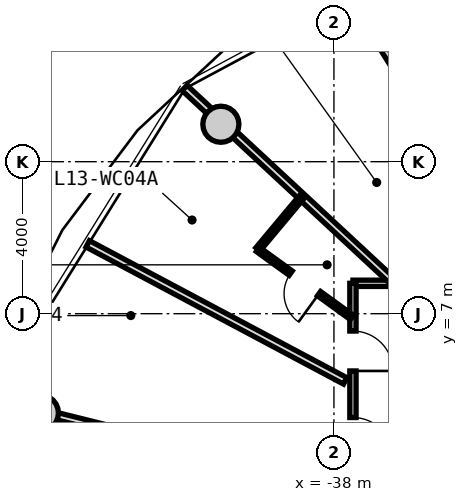
"""IFC4 building model, lengths in metres.
Left out: names, types, materials, properties, quantities, classifications, styles, units other than length and angle.
Written with IfcOpenShell. Run it as: python <this file> out.ifc"""

import sys

from ifc_helpers import new_model, si_unit, direction, frame, frame_2d, origin, origin_2d, place, context, subcontext, project, spatial, rectangle, circle, extrude, source, transform, mapped, element, fill, save


model = new_model("IFC4")
c1 = context("Model", 3, precision=1e-05, world=origin(), true_north=direction((0.0, 1.0)))
c2 = subcontext(c1, "Body", "Model", "MODEL_VIEW")
j1 = project(units=[si_unit("LENGTHUNIT", "METRE"), si_unit("PLANEANGLEUNIT", "RADIAN")], contexts=[c1])
p1 = place(None, origin())
s1 = spatial("IfcSite", under=j1, at=p1, CompositionType="ELEMENT")
p2 = place(p1, origin())
s2 = spatial("IfcBuilding", under=s1, at=p2, CompositionType="ELEMENT")
p3 = place(p2, frame((0.0, 0.0, 46.0)))
s3 = spatial("IfcBuildingStorey", under=s2, at=p3, CompositionType="ELEMENT", Elevation=46.0)
m1 = source(origin(), c2, "Body", "SweptSolid", [
    extrude(circle(Radius=0.475, at=origin_2d()), origin(), (0.0, 0.0, 1.0), 3.05),
])
for number, where, z_axis, x_axis in (
    (1, (-40.975, 11.985, 0.0), (0.0, 0.0, 1.0), (1.0, 0.0, 0.0)),
    (2, (-45.725, 4.387, 0.0), (0.0, 0.0, 1.0), (1.0, 0.0, 0.0)),
):
    element("IfcColumn", number, at=place(p3, frame(where, z_axis=z_axis, x_axis=x_axis)), inside=s3, PredefinedType="COLUMN", context=c2, shape_type="MappedRepresentation", body=[
        mapped(m1, transform((0.0, 0.0, 0.0), x_axis=(1.0, 0.0, 0.0), y_axis=(0.0, 1.0, 0.0), z_axis=(0.0, 0.0, 1.0), scale=1.0)),
    ])
m2 = source(origin(), c2, "Body", "SweptSolid", [
    extrude(rectangle(XDim=19.0, YDim=0.165, at=frame_2d((9.5, 0.0))), origin(), (0.0, 0.0, 1.0), 2.775),
])
p4 = place(p3, frame((-37.5, 7.8, 0.0), z_axis=(0.0, 0.0, 1.0), x_axis=(1.0, 0.0, 0.0)))
e3 = element("IfcWall", 3, at=p4, inside=s3, PredefinedType="PARTITIONING", context=c2, shape_type="MappedRepresentation", body=[
    mapped(m2, transform((0.0, 0.0, 0.0), x_axis=(1.0, 0.0, 0.0), y_axis=(0.0, 1.0, 0.0), z_axis=(0.0, 0.0, 1.0), scale=1.0)),
])
p5 = place(p4, frame((4.773, 0.0, 0.0)))
e4 = element("IfcOpeningElement", 4, at=p5, cuts=e3, PredefinedType="OPENING", context=c2, shape_type="SweptSolid", body=[
    extrude(rectangle(XDim=1.05, YDim=2.15, at=frame_2d((0.525, 1.075))), frame((0.0, 0.093, 0.0), z_axis=(0.0, -1.0, 0.0), x_axis=(1.0, 0.0, 0.0)), (0.0, 0.0, 1.0), 0.185),
])
p6 = place(p4, frame((2.251, 0.0, 0.0)))
e5 = element("IfcOpeningElement", 5, at=p6, cuts=e3, PredefinedType="OPENING", context=c2, shape_type="SweptSolid", body=[
    extrude(rectangle(XDim=1.05, YDim=2.15, at=frame_2d((0.525, 1.075))), frame((0.0, 0.093, 0.0), z_axis=(0.0, -1.0, 0.0), x_axis=(1.0, 0.0, 0.0)), (0.0, 0.0, 1.0), 0.185),
])
p7 = place(p4, frame((14.653, 0.0, 0.0)))
e6 = element("IfcOpeningElement", 6, at=p7, cuts=e3, PredefinedType="OPENING", context=c2, shape_type="SweptSolid", body=[
    extrude(rectangle(XDim=1.05, YDim=2.15, at=frame_2d((0.525, 1.075))), frame((0.0, 0.093, 0.0), z_axis=(0.0, -1.0, 0.0), x_axis=(1.0, 0.0, 0.0)), (0.0, 0.0, 1.0), 0.185),
])
p8 = place(p4, frame((12.5, 0.0, 0.0)))
e7 = element("IfcOpeningElement", 7, at=p8, cuts=e3, PredefinedType="OPENING", context=c2, shape_type="SweptSolid", body=[
    extrude(rectangle(XDim=1.05, YDim=2.15, at=frame_2d((0.525, 1.075))), frame((0.0, 0.093, 0.0), z_axis=(0.0, -1.0, 0.0), x_axis=(1.0, 0.0, 0.0)), (0.0, 0.0, 1.0), 0.185),
])
p9 = place(p4, frame((9.352, 0.0, 0.0)))
e8 = element("IfcOpeningElement", 8, at=p9, cuts=e3, PredefinedType="OPENING", context=c2, shape_type="SweptSolid", body=[
    extrude(rectangle(XDim=1.05, YDim=2.15, at=frame_2d((0.525, 1.075))), frame((0.0, 0.093, 0.0), z_axis=(0.0, -1.0, 0.0), x_axis=(1.0, 0.0, 0.0)), (0.0, 0.0, 1.0), 0.185),
])
p10 = place(p4, frame((7.806, 0.0, 0.0)))
e9 = element("IfcOpeningElement", 9, at=p10, cuts=e3, PredefinedType="OPENING", context=c2, shape_type="SweptSolid", body=[
    extrude(rectangle(XDim=1.05, YDim=2.15, at=frame_2d((0.525, 1.075))), frame((0.0, 0.093, 0.0), z_axis=(0.0, -1.0, 0.0), x_axis=(1.0, 0.0, 0.0)), (0.0, 0.0, 1.0), 0.185),
])
m3 = source(origin(), c2, "Body", "SweptSolid", [
    extrude(rectangle(XDim=15.6, YDim=0.165, at=frame_2d((7.8, 0.0))), origin(), (0.0, 0.0, 1.0), 2.775),
])
p11 = place(p3, frame((-37.5, -7.8, 0.0), z_axis=(0.0, 0.0, 1.0), x_axis=(0.0, 1.0, 0.0)))
e10 = element("IfcWall", 10, at=p11, inside=s3, PredefinedType="PARTITIONING", context=c2, shape_type="MappedRepresentation", body=[
    mapped(m3, transform((0.0, 0.0, 0.0), x_axis=(1.0, 0.0, 0.0), y_axis=(0.0, 1.0, 0.0), z_axis=(0.0, 0.0, 1.0), scale=1.0)),
])
p12 = place(p11, frame((13.293, 0.0, 0.0)))
e11 = element("IfcOpeningElement", 11, at=p12, cuts=e10, PredefinedType="OPENING", context=c2, shape_type="SweptSolid", body=[
    extrude(rectangle(XDim=1.05, YDim=2.15, at=frame_2d((0.525, 1.075))), frame((0.0, 0.093, 0.0), z_axis=(0.0, -1.0, 0.0), x_axis=(1.0, 0.0, 0.0)), (0.0, 0.0, 1.0), 0.185),
])
p13 = place(p11, frame((11.018, 0.0, 0.0)))
e12 = element("IfcOpeningElement", 12, at=p13, cuts=e10, PredefinedType="OPENING", context=c2, shape_type="SweptSolid", body=[
    extrude(rectangle(XDim=1.05, YDim=2.15, at=frame_2d((0.525, 1.075))), frame((0.0, 0.093, 0.0), z_axis=(0.0, -1.0, 0.0), x_axis=(1.0, 0.0, 0.0)), (0.0, 0.0, 1.0), 0.185),
])
p14 = place(p11, frame((7.812, 0.0, 0.0)))
e13 = element("IfcOpeningElement", 13, at=p14, cuts=e10, PredefinedType="OPENING", context=c2, shape_type="SweptSolid", body=[
    extrude(rectangle(XDim=1.05, YDim=2.15, at=frame_2d((0.525, 1.075))), frame((0.0, 0.093, 0.0), z_axis=(0.0, -1.0, 0.0), x_axis=(1.0, 0.0, 0.0)), (0.0, 0.0, 1.0), 0.185),
])
p15 = place(p11, frame((6.035, 0.0, 0.0)))
e14 = element("IfcOpeningElement", 14, at=p15, cuts=e10, PredefinedType="OPENING", context=c2, shape_type="SweptSolid", body=[
    extrude(rectangle(XDim=1.05, YDim=2.15, at=frame_2d((0.525, 1.075))), frame((0.0, 0.093, 0.0), z_axis=(0.0, -1.0, 0.0), x_axis=(1.0, 0.0, 0.0)), (0.0, 0.0, 1.0), 0.185),
])
p16 = place(p11, frame((3.489, 0.0, 0.0)))
e15 = element("IfcOpeningElement", 15, at=p16, cuts=e10, PredefinedType="OPENING", context=c2, shape_type="SweptSolid", body=[
    extrude(rectangle(XDim=1.05, YDim=2.15, at=frame_2d((0.525, 1.075))), frame((0.0, 0.093, 0.0), z_axis=(0.0, -1.0, 0.0), x_axis=(1.0, 0.0, 0.0)), (0.0, 0.0, 1.0), 0.185),
])
p17 = place(p11, frame((0.882, 0.0, 0.0)))
e16 = element("IfcOpeningElement", 16, at=p17, cuts=e10, PredefinedType="OPENING", context=c2, shape_type="SweptSolid", body=[
    extrude(rectangle(XDim=1.05, YDim=2.15, at=frame_2d((0.525, 1.075))), frame((0.0, 0.093, 0.0), z_axis=(0.0, -1.0, 0.0), x_axis=(1.0, 0.0, 0.0)), (0.0, 0.0, 1.0), 0.185),
])
m4 = source(origin(), c2, "Body", "SweptSolid", [
    extrude(rectangle(XDim=7.435, YDim=0.19, at=frame_2d((3.717, 0.0))), origin(), (0.0, 0.0, 1.0), 2.225),
])
p18 = place(p3, frame((-36.483, 7.88, 0.0), z_axis=(0.0, 0.0, 1.0), x_axis=(-0.732651956848, 0.680603489652, 0.0)))
e17 = element("IfcWall", 17, at=p18, inside=s3, PredefinedType="PARTITIONING", context=c2, shape_type="MappedRepresentation", body=[
    mapped(m4, transform((0.0, 0.0, 0.0), x_axis=(1.0, 0.0, 0.0), y_axis=(0.0, 1.0, 0.0), z_axis=(0.0, 0.0, 1.0), scale=1.0)),
])
m5 = source(origin(), c2, "Body", "SweptSolid", [
    extrude(rectangle(XDim=8.598, YDim=0.19, at=frame_2d((4.299, 0.0))), origin(), (0.0, 0.0, 1.0), 2.775),
])
p19 = place(p3, frame((-32.957, 8.017, 0.0), z_axis=(0.0, 0.0, 1.0), x_axis=(-0.530039776395, 0.847972779893, 0.0)))
e18 = element("IfcWall", 18, at=p19, inside=s3, PredefinedType="PARTITIONING", context=c2, shape_type="MappedRepresentation", body=[
    mapped(m5, transform((0.0, 0.0, 0.0), x_axis=(1.0, 0.0, 0.0), y_axis=(0.0, 1.0, 0.0), z_axis=(0.0, 0.0, 1.0), scale=1.0)),
])
m6 = source(origin(), c2, "Body", "SweptSolid", [
    extrude(rectangle(XDim=9.737, YDim=0.19, at=frame_2d((4.869, 0.0))), origin(), (0.0, 0.0, 1.0), 2.225),
])
p20 = place(p3, frame((-37.58, 2.385, 0.0), z_axis=(0.0, 0.0, 1.0), x_axis=(-0.970392716238, 0.241532557375, 0.0)))
e19 = element("IfcWall", 19, at=p20, inside=s3, PredefinedType="PARTITIONING", context=c2, shape_type="MappedRepresentation", body=[
    mapped(m6, transform((0.0, 0.0, 0.0), x_axis=(1.0, 0.0, 0.0), y_axis=(0.0, 1.0, 0.0), z_axis=(0.0, 0.0, 1.0), scale=1.0)),
])
m7 = source(origin(), c2, "Body", "SweptSolid", [
    extrude(rectangle(XDim=7.677, YDim=0.19, at=frame_2d((3.838, 0.0))), origin(), (0.0, 0.0, 1.0), 2.775),
])
p21 = place(p3, frame((-37.703, 5.231, 0.0), z_axis=(0.0, 0.0, 1.0), x_axis=(-0.882725057546, 0.469889851753, 0.0)))
e20 = element("IfcWall", 20, at=p21, inside=s3, PredefinedType="PARTITIONING", context=c2, shape_type="MappedRepresentation", body=[
    mapped(m7, transform((0.0, 0.0, 0.0), x_axis=(1.0, 0.0, 0.0), y_axis=(0.0, 1.0, 0.0), z_axis=(0.0, 0.0, 1.0), scale=1.0)),
])
m8 = source(origin(), c2, "Body", "SweptSolid", [
    extrude(rectangle(XDim=3.051, YDim=0.14, at=frame_2d((1.525, 0.0))), origin(), (0.0, 0.0, 1.0), 2.775),
])
p22 = place(p3, frame((-37.53, 6.903, 0.0), z_axis=(0.0, 0.0, 1.0), x_axis=(-0.809849031404, 0.586638343729, 0.0)))
e21 = element("IfcWall", 21, at=p22, inside=s3, PredefinedType="PARTITIONING", context=c2, shape_type="MappedRepresentation", body=[
    mapped(m8, transform((0.0, 0.0, 0.0), x_axis=(1.0, 0.0, 0.0), y_axis=(0.0, 1.0, 0.0), z_axis=(0.0, 0.0, 1.0), scale=1.0)),
])
p23 = place(p22, frame((1.065, 0.0, 0.0)))
e22 = element("IfcOpeningElement", 22, at=p23, cuts=e21, PredefinedType="OPENING", context=c2, shape_type="SweptSolid", body=[
    extrude(rectangle(XDim=0.92, YDim=2.1, at=frame_2d((0.46, 1.05))), frame((0.0, 0.08, 0.0), z_axis=(0.0, -1.0, 0.0), x_axis=(1.0, 0.0, 0.0)), (0.0, 0.0, 1.0), 0.16),
])
m9 = source(origin(), c2, "Body", "SweptSolid", [
    extrude(rectangle(XDim=1.84, YDim=0.14, at=frame_2d((0.92, 0.0))), origin(), (0.0, 0.0, 1.0), 2.415),
])
p24 = place(p3, frame((-40.0, 8.692, 0.0), z_axis=(0.0, 0.0, 1.0), x_axis=(0.641410397049, 0.767197955262, 0.0)))
e23 = element("IfcWall", 23, at=p24, inside=s3, PredefinedType="PARTITIONING", context=c2, shape_type="MappedRepresentation", body=[
    mapped(m9, transform((0.0, 0.0, 0.0), x_axis=(1.0, 0.0, 0.0), y_axis=(0.0, 1.0, 0.0), z_axis=(0.0, 0.0, 1.0), scale=1.0)),
])
m10 = source(origin(), c2, "Body", "SweptSolid", [
    extrude(rectangle(XDim=1.05, YDim=2.15, at=frame_2d((0.525, 1.075))), frame((0.0, 0.025, 0.0), z_axis=(0.0, -1.0, 0.0), x_axis=(1.0, 0.0, 0.0)), (0.0, 0.0, 1.0), 0.05),
])
p25 = place(p12, frame((1.05, 0.0, 0.0), z_axis=(0.0, 0.0, 1.0), x_axis=(-1.0, 0.0, 0.0)))
e24 = element("IfcDoor", 24, at=p25, inside=s3, OperationType="SINGLE_SWING_RIGHT", PredefinedType="DOOR", context=c2, shape_type="MappedRepresentation", body=[
    mapped(m10, transform((0.0, 0.0, 0.0), x_axis=(1.0, 0.0, 0.0), y_axis=(0.0, 1.0, 0.0), z_axis=(0.0, 0.0, 1.0), scale=1.0)),
])
fill(e11, e24)
m11 = source(origin(), c2, "Body", "SweptSolid", [
    extrude(rectangle(XDim=0.92, YDim=2.1, at=frame_2d((0.46, 1.05))), frame((0.0, 0.025, 0.0), z_axis=(0.0, -1.0, 0.0), x_axis=(1.0, 0.0, 0.0)), (0.0, 0.0, 1.0), 0.05),
])
p26 = place(p23, origin())
e25 = element("IfcDoor", 25, at=p26, inside=s3, OperationType="SINGLE_SWING_LEFT", PredefinedType="DOOR", context=c2, shape_type="MappedRepresentation", body=[
    mapped(m11, transform((0.0, 0.0, 0.0), x_axis=(1.0, 0.0, 0.0), y_axis=(0.0, 1.0, 0.0), z_axis=(0.0, 0.0, 1.0), scale=1.0)),
])
fill(e22, e25)
p27 = place(p13, frame((1.05, 0.0, 0.0), z_axis=(0.0, 0.0, 1.0), x_axis=(-1.0, 0.0, 0.0)))
e26 = element("IfcDoor", 26, at=p27, inside=s3, OperationType="SINGLE_SWING_RIGHT", PredefinedType="DOOR", context=c2, shape_type="MappedRepresentation", body=[
    mapped(m10, transform((0.0, 0.0, 0.0), x_axis=(1.0, 0.0, 0.0), y_axis=(0.0, 1.0, 0.0), z_axis=(0.0, 0.0, 1.0), scale=1.0)),
])
fill(e12, e26)
save(model, sys.argv[1])
